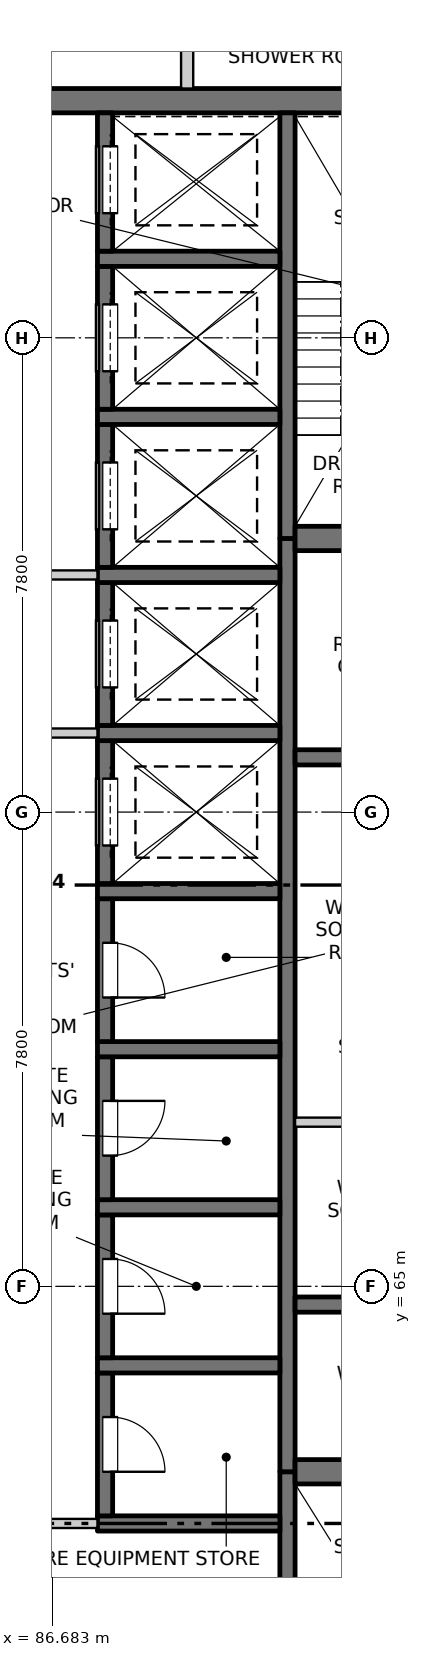
"""IFC4 building model, lengths in metres.
Left out: names, types, materials, properties, quantities, classifications, styles, units other than length and angle.
Written with IfcOpenShell. Run it as: python <this file> out.ifc"""

import sys

from ifc_helpers import new_model, si_unit, direction, frame, frame_2d, origin, place, context, subcontext, project, spatial, rectangle, extrude, element, fill, save


model = new_model("IFC4")
c1 = context("Model", 3, precision=1e-05, world=origin(), true_north=direction((0.0, 1.0)))
c2 = subcontext(c1, "Body", "Model", "MODEL_VIEW")
j1 = project(units=[si_unit("LENGTHUNIT", "METRE"), si_unit("PLANEANGLEUNIT", "RADIAN")], contexts=[c1])
p1 = place(None, origin())
s1 = spatial("IfcSite", under=j1, at=p1, CompositionType="ELEMENT")
p2 = place(p1, origin())
s2 = spatial("IfcBuilding", under=s1, at=p2, CompositionType="ELEMENT")
p3 = place(p2, frame((0.0, 0.0, 221.1)))
s3 = spatial("IfcBuildingStorey", under=s2, at=p3, CompositionType="ELEMENT", Elevation=221.1)
p4 = place(p3, frame((75.45, 84.5, -0.25), z_axis=(0.0, 0.0, 1.0), x_axis=(1.0, 0.0, 0.0)))
e1 = element("IfcWall", 1, at=p4, inside=s3, PredefinedType="SOLIDWALL", context=c2, shape_type="SweptSolid", body=[
    extrude(rectangle(XDim=19.1, YDim=0.4, at=frame_2d((9.55, 0.0))), origin(), (0.0, 0.0, 1.0), 3.4),
])
p5 = place(p3, frame((90.55, 55.45, -0.25), z_axis=(0.0, 0.0, 1.0), x_axis=(0.0, 1.0, 0.0)))
e2 = element("IfcWall", 2, at=p5, inside=s3, PredefinedType="SOLIDWALL", context=c2, shape_type="SweptSolid", body=[
    extrude(rectangle(XDim=6.5, YDim=0.25, at=frame_2d((3.25, 0.0))), origin(), (0.0, 0.0, 1.0), 3.4),
])
p6 = place(p5, frame((0.2, 0.0, 0.25)))
e3 = element("IfcOpeningElement", 3, at=p6, cuts=e2, PredefinedType="OPENING", context=c2, shape_type="SweptSolid", body=[
    extrude(rectangle(XDim=1.2, YDim=2.1, at=frame_2d((0.6, 1.05))), frame((0.0, 0.135, 0.0), z_axis=(0.0, -1.0, 0.0), x_axis=(1.0, 0.0, 0.0)), (0.0, 0.0, 1.0), 0.27),
])
p7 = place(p3, frame((90.55, 61.95, -0.25), z_axis=(0.0, 0.0, 1.0), x_axis=(0.0, 1.0, 0.0)))
e4 = element("IfcWall", 4, at=p7, inside=s3, PredefinedType="SOLIDWALL", context=c2, shape_type="SweptSolid", body=[
    extrude(rectangle(XDim=15.35, YDim=0.25, at=frame_2d((7.675, 0.0))), origin(), (0.0, 0.0, 1.0), 3.4),
])
p8 = place(p3, frame((90.55, 77.3, -0.25), z_axis=(0.0, 0.0, 1.0), x_axis=(0.0, 1.0, 0.0)))
e5 = element("IfcWall", 5, at=p8, inside=s3, PredefinedType="SOLIDWALL", context=c2, shape_type="SweptSolid", body=[
    extrude(rectangle(XDim=7.0, YDim=0.25, at=frame_2d((3.5, 0.0))), origin(), (0.0, 0.0, 1.0), 3.4),
])
p9 = place(p3, frame((87.425, 61.1, -0.25), z_axis=(0.0, 0.0, 1.0), x_axis=(1.0, 0.0, 0.0)))
e6 = element("IfcWall", 6, at=p9, inside=s3, PredefinedType="SOLIDWALL", context=c2, shape_type="SweptSolid", body=[
    extrude(rectangle(XDim=3.0, YDim=0.25, at=frame_2d((1.5, 0.0))), origin(), (0.0, 0.0, 1.0), 3.4),
])
p10 = place(p3, frame((87.55, 61.225, -0.25), z_axis=(0.0, 0.0, 1.0), x_axis=(0.0, 1.0, 0.0)))
e7 = element("IfcWall", 7, at=p10, inside=s3, PredefinedType="SOLIDWALL", context=c2, shape_type="SweptSolid", body=[
    extrude(rectangle(XDim=2.35, YDim=0.25, at=frame_2d((1.175, 0.0))), origin(), (0.0, 0.0, 1.0), 3.4),
])
p11 = place(p10, frame((0.725, 0.0, 0.25)))
e8 = element("IfcOpeningElement", 8, at=p11, cuts=e7, PredefinedType="OPENING", context=c2, shape_type="SweptSolid", body=[
    extrude(rectangle(XDim=0.9, YDim=2.1, at=frame_2d((0.45, 1.05))), frame((0.0, 0.135, 0.0), z_axis=(0.0, -1.0, 0.0), x_axis=(1.0, 0.0, 0.0)), (0.0, 0.0, 1.0), 0.27),
])
p12 = place(p3, frame((87.425, 63.7, -0.25), z_axis=(0.0, 0.0, 1.0), x_axis=(1.0, 0.0, 0.0)))
e9 = element("IfcWall", 9, at=p12, inside=s3, PredefinedType="SOLIDWALL", context=c2, shape_type="SweptSolid", body=[
    extrude(rectangle(XDim=3.0, YDim=0.25, at=frame_2d((1.5, 0.0))), origin(), (0.0, 0.0, 1.0), 3.4),
])
p13 = place(p3, frame((87.55, 63.825, -0.25), z_axis=(0.0, 0.0, 1.0), x_axis=(0.0, 1.0, 0.0)))
e10 = element("IfcWall", 10, at=p13, inside=s3, PredefinedType="SOLIDWALL", context=c2, shape_type="SweptSolid", body=[
    extrude(rectangle(XDim=2.35, YDim=0.25, at=frame_2d((1.175, 0.0))), origin(), (0.0, 0.0, 1.0), 3.4),
])
p14 = place(p13, frame((0.725, 0.0, 0.25)))
e11 = element("IfcOpeningElement", 11, at=p14, cuts=e10, PredefinedType="OPENING", context=c2, shape_type="SweptSolid", body=[
    extrude(rectangle(XDim=0.9, YDim=2.1, at=frame_2d((0.45, 1.05))), frame((0.0, 0.135, 0.0), z_axis=(0.0, -1.0, 0.0), x_axis=(1.0, 0.0, 0.0)), (0.0, 0.0, 1.0), 0.27),
])
p15 = place(p3, frame((87.425, 66.3, -0.25), z_axis=(0.0, 0.0, 1.0), x_axis=(1.0, 0.0, 0.0)))
e12 = element("IfcWall", 12, at=p15, inside=s3, PredefinedType="SOLIDWALL", context=c2, shape_type="SweptSolid", body=[
    extrude(rectangle(XDim=3.0, YDim=0.25, at=frame_2d((1.5, 0.0))), origin(), (0.0, 0.0, 1.0), 3.4),
])
p16 = place(p3, frame((87.55, 66.425, -0.25), z_axis=(0.0, 0.0, 1.0), x_axis=(0.0, 1.0, 0.0)))
e13 = element("IfcWall", 13, at=p16, inside=s3, PredefinedType="SOLIDWALL", context=c2, shape_type="SweptSolid", body=[
    extrude(rectangle(XDim=2.35, YDim=0.25, at=frame_2d((1.175, 0.0))), origin(), (0.0, 0.0, 1.0), 3.4),
])
p17 = place(p16, frame((0.725, 0.0, 0.25)))
e14 = element("IfcOpeningElement", 14, at=p17, cuts=e13, PredefinedType="OPENING", context=c2, shape_type="SweptSolid", body=[
    extrude(rectangle(XDim=0.9, YDim=2.1, at=frame_2d((0.45, 1.05))), frame((0.0, 0.135, 0.0), z_axis=(0.0, -1.0, 0.0), x_axis=(1.0, 0.0, 0.0)), (0.0, 0.0, 1.0), 0.27),
])
p18 = place(p3, frame((87.425, 68.9, -0.25), z_axis=(0.0, 0.0, 1.0), x_axis=(1.0, 0.0, 0.0)))
e15 = element("IfcWall", 15, at=p18, inside=s3, PredefinedType="SOLIDWALL", context=c2, shape_type="SweptSolid", body=[
    extrude(rectangle(XDim=3.0, YDim=0.25, at=frame_2d((1.5, 0.0))), origin(), (0.0, 0.0, 1.0), 3.4),
])
p19 = place(p3, frame((87.55, 69.025, -0.25), z_axis=(0.0, 0.0, 1.0), x_axis=(0.0, 1.0, 0.0)))
e16 = element("IfcWall", 16, at=p19, inside=s3, PredefinedType="SOLIDWALL", context=c2, shape_type="SweptSolid", body=[
    extrude(rectangle(XDim=2.35, YDim=0.25, at=frame_2d((1.175, 0.0))), origin(), (0.0, 0.0, 1.0), 3.4),
])
p20 = place(p19, frame((0.725, 0.0, 0.25)))
e17 = element("IfcOpeningElement", 17, at=p20, cuts=e16, PredefinedType="OPENING", context=c2, shape_type="SweptSolid", body=[
    extrude(rectangle(XDim=0.9, YDim=2.1, at=frame_2d((0.45, 1.05))), frame((0.0, 0.135, 0.0), z_axis=(0.0, -1.0, 0.0), x_axis=(1.0, 0.0, 0.0)), (0.0, 0.0, 1.0), 0.27),
])
p21 = place(p3, frame((87.425, 71.5, -0.25), z_axis=(0.0, 0.0, 1.0), x_axis=(1.0, 0.0, 0.0)))
e18 = element("IfcWall", 18, at=p21, inside=s3, PredefinedType="SOLIDWALL", context=c2, shape_type="SweptSolid", body=[
    extrude(rectangle(XDim=3.0, YDim=0.25, at=frame_2d((1.5, 0.0))), origin(), (0.0, 0.0, 1.0), 3.4),
])
p22 = place(p3, frame((87.55, 71.625, -0.25), z_axis=(0.0, 0.0, 1.0), x_axis=(0.0, 1.0, 0.0)))
e19 = element("IfcWall", 19, at=p22, inside=s3, PredefinedType="SOLIDWALL", context=c2, shape_type="SweptSolid", body=[
    extrude(rectangle(XDim=2.35, YDim=0.25, at=frame_2d((1.175, 0.0))), origin(), (0.0, 0.0, 1.0), 3.4),
])
p23 = place(p22, frame((0.625, 0.0, 0.25)))
e20 = element("IfcOpeningElement", 20, at=p23, cuts=e19, PredefinedType="OPENING", context=c2, shape_type="SweptSolid", body=[
    extrude(rectangle(XDim=1.1, YDim=2.1, at=frame_2d((0.55, 1.05))), frame((0.0, 0.135, 0.0), z_axis=(0.0, -1.0, 0.0), x_axis=(1.0, 0.0, 0.0)), (0.0, 0.0, 1.0), 0.27),
])
p24 = place(p3, frame((87.425, 74.1, -0.25), z_axis=(0.0, 0.0, 1.0), x_axis=(1.0, 0.0, 0.0)))
e21 = element("IfcWall", 21, at=p24, inside=s3, PredefinedType="SOLIDWALL", context=c2, shape_type="SweptSolid", body=[
    extrude(rectangle(XDim=3.0, YDim=0.25, at=frame_2d((1.5, 0.0))), origin(), (0.0, 0.0, 1.0), 3.4),
])
p25 = place(p3, frame((87.55, 74.225, -0.25), z_axis=(0.0, 0.0, 1.0), x_axis=(0.0, 1.0, 0.0)))
e22 = element("IfcWall", 22, at=p25, inside=s3, PredefinedType="SOLIDWALL", context=c2, shape_type="SweptSolid", body=[
    extrude(rectangle(XDim=2.35, YDim=0.25, at=frame_2d((1.175, 0.0))), origin(), (0.0, 0.0, 1.0), 3.4),
])
p26 = place(p25, frame((0.625, 0.0, 0.25)))
e23 = element("IfcOpeningElement", 23, at=p26, cuts=e22, PredefinedType="OPENING", context=c2, shape_type="SweptSolid", body=[
    extrude(rectangle(XDim=1.1, YDim=2.1, at=frame_2d((0.55, 1.05))), frame((0.0, 0.135, 0.0), z_axis=(0.0, -1.0, 0.0), x_axis=(1.0, 0.0, 0.0)), (0.0, 0.0, 1.0), 0.27),
])
p27 = place(p3, frame((87.425, 76.7, -0.25), z_axis=(0.0, 0.0, 1.0), x_axis=(1.0, 0.0, 0.0)))
e24 = element("IfcWall", 24, at=p27, inside=s3, PredefinedType="SOLIDWALL", context=c2, shape_type="SweptSolid", body=[
    extrude(rectangle(XDim=3.0, YDim=0.25, at=frame_2d((1.5, 0.0))), origin(), (0.0, 0.0, 1.0), 3.4),
])
p28 = place(p3, frame((87.55, 76.825, -0.25), z_axis=(0.0, 0.0, 1.0), x_axis=(0.0, 1.0, 0.0)))
e25 = element("IfcWall", 25, at=p28, inside=s3, PredefinedType="SOLIDWALL", context=c2, shape_type="SweptSolid", body=[
    extrude(rectangle(XDim=2.35, YDim=0.25, at=frame_2d((1.175, 0.0))), origin(), (0.0, 0.0, 1.0), 3.4),
])
p29 = place(p28, frame((0.625, 0.0, 0.25)))
e26 = element("IfcOpeningElement", 26, at=p29, cuts=e25, PredefinedType="OPENING", context=c2, shape_type="SweptSolid", body=[
    extrude(rectangle(XDim=1.1, YDim=2.1, at=frame_2d((0.55, 1.05))), frame((0.0, 0.135, 0.0), z_axis=(0.0, -1.0, 0.0), x_axis=(1.0, 0.0, 0.0)), (0.0, 0.0, 1.0), 0.27),
])
p30 = place(p3, frame((87.425, 79.3, -0.25), z_axis=(0.0, 0.0, 1.0), x_axis=(1.0, 0.0, 0.0)))
e27 = element("IfcWall", 27, at=p30, inside=s3, PredefinedType="SOLIDWALL", context=c2, shape_type="SweptSolid", body=[
    extrude(rectangle(XDim=3.0, YDim=0.25, at=frame_2d((1.5, 0.0))), origin(), (0.0, 0.0, 1.0), 3.4),
])
p31 = place(p3, frame((87.55, 79.425, -0.25), z_axis=(0.0, 0.0, 1.0), x_axis=(0.0, 1.0, 0.0)))
e28 = element("IfcWall", 28, at=p31, inside=s3, PredefinedType="SOLIDWALL", context=c2, shape_type="SweptSolid", body=[
    extrude(rectangle(XDim=2.35, YDim=0.25, at=frame_2d((1.175, 0.0))), origin(), (0.0, 0.0, 1.0), 3.4),
])
p32 = place(p31, frame((0.625, 0.0, 0.25)))
e29 = element("IfcOpeningElement", 29, at=p32, cuts=e28, PredefinedType="OPENING", context=c2, shape_type="SweptSolid", body=[
    extrude(rectangle(XDim=1.1, YDim=2.1, at=frame_2d((0.55, 1.05))), frame((0.0, 0.135, 0.0), z_axis=(0.0, -1.0, 0.0), x_axis=(1.0, 0.0, 0.0)), (0.0, 0.0, 1.0), 0.27),
])
p33 = place(p3, frame((87.425, 81.9, -0.25), z_axis=(0.0, 0.0, 1.0), x_axis=(1.0, 0.0, 0.0)))
e30 = element("IfcWall", 30, at=p33, inside=s3, PredefinedType="SOLIDWALL", context=c2, shape_type="SweptSolid", body=[
    extrude(rectangle(XDim=3.0, YDim=0.25, at=frame_2d((1.5, 0.0))), origin(), (0.0, 0.0, 1.0), 3.4),
])
p34 = place(p3, frame((87.55, 82.025, -0.25), z_axis=(0.0, 0.0, 1.0), x_axis=(0.0, 1.0, 0.0)))
e31 = element("IfcWall", 31, at=p34, inside=s3, PredefinedType="SOLIDWALL", context=c2, shape_type="SweptSolid", body=[
    extrude(rectangle(XDim=2.275, YDim=0.25, at=frame_2d((1.138, 0.0))), origin(), (0.0, 0.0, 1.0), 3.4),
])
p35 = place(p34, frame((0.625, 0.0, 0.25)))
e32 = element("IfcOpeningElement", 32, at=p35, cuts=e31, PredefinedType="OPENING", context=c2, shape_type="SweptSolid", body=[
    extrude(rectangle(XDim=1.1, YDim=2.1, at=frame_2d((0.55, 1.05))), frame((0.0, 0.135, 0.0), z_axis=(0.0, -1.0, 0.0), x_axis=(1.0, 0.0, 0.0)), (0.0, 0.0, 1.0), 0.27),
])
p36 = place(p3, frame((90.675, 61.95, -0.25), z_axis=(0.0, 0.0, 1.0), x_axis=(1.0, 0.0, 0.0)))
e33 = element("IfcWall", 33, at=p36, inside=s3, PredefinedType="SOLIDWALL", context=c2, shape_type="SweptSolid", body=[
    extrude(rectangle(XDim=3.875, YDim=0.4, at=frame_2d((1.938, 0.0))), origin(), (0.0, 0.0, 1.0), 3.4),
])
for number, where, z_axis, x_axis in (
    (34, (90.675, 64.7, -0.25), (0.0, 0.0, 1.0), (1.0, 0.0, 0.0)),
    (35, (90.675, 73.7, -0.25), (0.0, 0.0, 1.0), (1.0, 0.0, 0.0)),
):
    element("IfcWall", number, at=place(p3, frame(where, z_axis=z_axis, x_axis=x_axis)), inside=s3, PredefinedType="SOLIDWALL", context=c2, shape_type="SweptSolid", body=[
        extrude(rectangle(XDim=3.875, YDim=0.25, at=frame_2d((1.938, 0.0))), origin(), (0.0, 0.0, 1.0), 3.4),
    ])
p37 = place(p3, frame((90.675, 77.3, -0.25), z_axis=(0.0, 0.0, 1.0), x_axis=(1.0, 0.0, 0.0)))
e36 = element("IfcWall", 36, at=p37, inside=s3, PredefinedType="SOLIDWALL", context=c2, shape_type="SweptSolid", body=[
    extrude(rectangle(XDim=3.875, YDim=0.4, at=frame_2d((1.938, 0.0))), origin(), (0.0, 0.0, 1.0), 3.4),
])
p38 = place(p3, frame((82.575, 61.1, 0.0), z_axis=(0.0, 0.0, 1.0), x_axis=(1.0, 0.0, 0.0)))
e37 = element("IfcWall", 37, at=p38, inside=s3, PredefinedType="PARTITIONING", context=c2, shape_type="SweptSolid", body=[
    extrude(rectangle(XDim=4.85, YDim=0.15, at=frame_2d((2.425, 0.0))), origin(), (0.0, 0.0, 1.0), 3.15),
])
p39 = place(p38, frame((1.525, 0.0, 0.0)))
e38 = element("IfcOpeningElement", 38, at=p39, cuts=e37, PredefinedType="OPENING", context=c2, shape_type="SweptSolid", body=[
    extrude(rectangle(XDim=1.8, YDim=2.1, at=frame_2d((0.9, 1.05))), frame((0.0, 0.085, 0.0), z_axis=(0.0, -1.0, 0.0), x_axis=(1.0, 0.0, 0.0)), (0.0, 0.0, 1.0), 0.17),
])
p40 = place(p3, frame((90.675, 67.7, 0.0), z_axis=(0.0, 0.0, 1.0), x_axis=(1.0, 0.0, 0.0)))
e39 = element("IfcWall", 39, at=p40, inside=s3, PredefinedType="PARTITIONING", context=c2, shape_type="SweptSolid", body=[
    extrude(rectangle(XDim=3.875, YDim=0.15, at=frame_2d((1.938, 0.0))), origin(), (0.0, 0.0, 1.0), 3.15),
])
p41 = place(p3, frame((82.575, 74.1, 0.0), z_axis=(0.0, 0.0, 1.0), x_axis=(1.0, 0.0, 0.0)))
e40 = element("IfcWall", 40, at=p41, inside=s3, PredefinedType="PARTITIONING", context=c2, shape_type="SweptSolid", body=[
    extrude(rectangle(XDim=4.85, YDim=0.15, at=frame_2d((2.425, 0.0))), origin(), (0.0, 0.0, 1.0), 3.15),
])
p42 = place(p41, frame((1.525, 0.0, 0.0)))
e41 = element("IfcOpeningElement", 41, at=p42, cuts=e40, PredefinedType="OPENING", context=c2, shape_type="SweptSolid", body=[
    extrude(rectangle(XDim=1.8, YDim=2.1, at=frame_2d((0.9, 1.05))), frame((0.0, 0.085, 0.0), z_axis=(0.0, -1.0, 0.0), x_axis=(1.0, 0.0, 0.0)), (0.0, 0.0, 1.0), 0.17),
])
p43 = place(p3, frame((82.575, 76.7, 0.0), z_axis=(0.0, 0.0, 1.0), x_axis=(1.0, 0.0, 0.0)))
e42 = element("IfcWall", 42, at=p43, inside=s3, PredefinedType="PARTITIONING", context=c2, shape_type="SweptSolid", body=[
    extrude(rectangle(XDim=4.85, YDim=0.15, at=frame_2d((2.425, 0.0))), origin(), (0.0, 0.0, 1.0), 3.15),
])
p44 = place(p43, frame((1.525, 0.0, 0.0)))
e43 = element("IfcOpeningElement", 43, at=p44, cuts=e42, PredefinedType="OPENING", context=c2, shape_type="SweptSolid", body=[
    extrude(rectangle(XDim=1.8, YDim=2.1, at=frame_2d((0.9, 1.05))), frame((0.0, 0.085, 0.0), z_axis=(0.0, -1.0, 0.0), x_axis=(1.0, 0.0, 0.0)), (0.0, 0.0, 1.0), 0.17),
])
p45 = place(p3, frame((88.9, 84.7, 0.0), z_axis=(0.0, 0.0, 1.0), x_axis=(0.0, 1.0, 0.0)))
e44 = element("IfcWall", 44, at=p45, inside=s3, PredefinedType="PARTITIONING", context=c2, shape_type="SweptSolid", body=[
    extrude(rectangle(XDim=3.4, YDim=0.2, at=frame_2d((1.7, 0.0))), origin(), (0.0, 0.0, 1.0), 3.15),
])
p46 = place(p11, origin())
e45 = element("IfcDoor", 45, at=p46, inside=s3, OperationType="SINGLE_SWING_RIGHT", PredefinedType="DOOR", context=c2, shape_type="SweptSolid", body=[
    extrude(rectangle(XDim=0.9, YDim=2.1, at=frame_2d((0.45, 1.05))), frame((0.0, -0.06, 0.0), z_axis=(0.0, -1.0, 0.0), x_axis=(1.0, 0.0, 0.0)), (0.0, 0.0, 1.0), 0.05),
])
fill(e8, e45)
p47 = place(p14, origin())
e46 = element("IfcDoor", 46, at=p47, inside=s3, OperationType="SINGLE_SWING_RIGHT", PredefinedType="DOOR", context=c2, shape_type="SweptSolid", body=[
    extrude(rectangle(XDim=0.9, YDim=2.1, at=frame_2d((0.45, 1.05))), frame((0.0, -0.06, 0.0), z_axis=(0.0, -1.0, 0.0), x_axis=(1.0, 0.0, 0.0)), (0.0, 0.0, 1.0), 0.05),
])
fill(e11, e46)
p48 = place(p17, origin())
e47 = element("IfcDoor", 47, at=p48, inside=s3, OperationType="SINGLE_SWING_LEFT", PredefinedType="DOOR", context=c2, shape_type="SweptSolid", body=[
    extrude(rectangle(XDim=0.9, YDim=2.1, at=frame_2d((0.45, 1.05))), frame((0.0, -0.06, 0.0), z_axis=(0.0, -1.0, 0.0), x_axis=(1.0, 0.0, 0.0)), (0.0, 0.0, 1.0), 0.05),
])
fill(e14, e47)
p49 = place(p20, origin())
e48 = element("IfcDoor", 48, at=p49, inside=s3, OperationType="SINGLE_SWING_RIGHT", PredefinedType="DOOR", context=c2, shape_type="SweptSolid", body=[
    extrude(rectangle(XDim=0.9, YDim=2.1, at=frame_2d((0.45, 1.05))), frame((0.0, -0.06, 0.0), z_axis=(0.0, -1.0, 0.0), x_axis=(1.0, 0.0, 0.0)), (0.0, 0.0, 1.0), 0.05),
])
fill(e17, e48)
p50 = place(p23, origin())
e49 = element("IfcDoor", 49, at=p50, inside=s3, OperationType="SLIDING_TO_LEFT", PredefinedType="DOOR", context=c2, shape_type="SweptSolid", body=[
    extrude(rectangle(XDim=1.1, YDim=2.1, at=frame_2d((0.55, 1.05))), frame((0.0, -0.06, 0.0), z_axis=(0.0, -1.0, 0.0), x_axis=(1.0, 0.0, 0.0)), (0.0, 0.0, 1.0), 0.05),
])
fill(e20, e49)
p51 = place(p26, origin())
e50 = element("IfcDoor", 50, at=p51, inside=s3, OperationType="SLIDING_TO_LEFT", PredefinedType="DOOR", context=c2, shape_type="SweptSolid", body=[
    extrude(rectangle(XDim=1.1, YDim=2.1, at=frame_2d((0.55, 1.05))), frame((0.0, -0.06, 0.0), z_axis=(0.0, -1.0, 0.0), x_axis=(1.0, 0.0, 0.0)), (0.0, 0.0, 1.0), 0.05),
])
fill(e23, e50)
p52 = place(p29, origin())
e51 = element("IfcDoor", 51, at=p52, inside=s3, OperationType="SLIDING_TO_LEFT", PredefinedType="DOOR", context=c2, shape_type="SweptSolid", body=[
    extrude(rectangle(XDim=1.1, YDim=2.1, at=frame_2d((0.55, 1.05))), frame((0.0, -0.06, 0.0), z_axis=(0.0, -1.0, 0.0), x_axis=(1.0, 0.0, 0.0)), (0.0, 0.0, 1.0), 0.05),
])
fill(e26, e51)
p53 = place(p32, origin())
e52 = element("IfcDoor", 52, at=p53, inside=s3, OperationType="SLIDING_TO_RIGHT", PredefinedType="DOOR", context=c2, shape_type="SweptSolid", body=[
    extrude(rectangle(XDim=1.1, YDim=2.1, at=frame_2d((0.55, 1.05))), frame((0.0, -0.06, 0.0), z_axis=(0.0, -1.0, 0.0), x_axis=(1.0, 0.0, 0.0)), (0.0, 0.0, 1.0), 0.05),
])
fill(e29, e52)
p54 = place(p35, origin())
e53 = element("IfcDoor", 53, at=p54, inside=s3, OperationType="SLIDING_TO_RIGHT", PredefinedType="DOOR", context=c2, shape_type="SweptSolid", body=[
    extrude(rectangle(XDim=1.1, YDim=2.1, at=frame_2d((0.55, 1.05))), frame((0.0, -0.06, 0.0), z_axis=(0.0, -1.0, 0.0), x_axis=(1.0, 0.0, 0.0)), (0.0, 0.0, 1.0), 0.05),
])
fill(e32, e53)
save(model, sys.argv[1])
